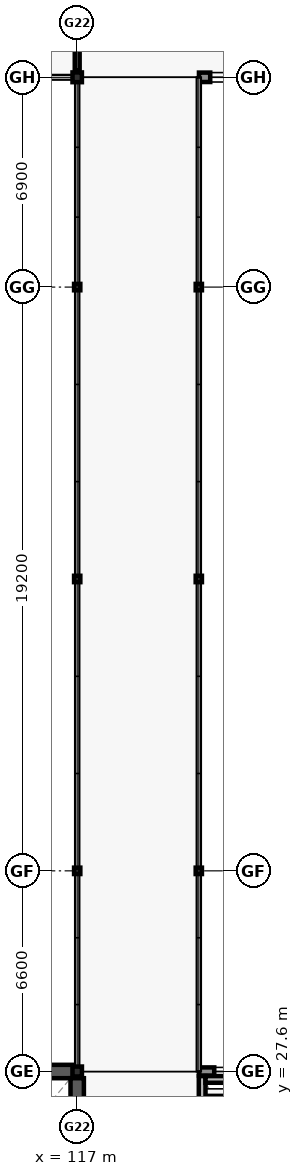
"""IFC4 building model, lengths in metres.
Left out: names, types, materials, properties, quantities, classifications, styles, units other than length and angle.
Written with IfcOpenShell. Run it as: python <this file> out.ifc"""

import sys

from ifc_helpers import new_model, si_unit, direction, frame, frame_2d, origin, origin_2d, place, context, subcontext, project, spatial, rectangle, i_section, extrude, element, fill, save


model = new_model("IFC4")
c1 = context("Model", 3, precision=1e-05, world=origin(), true_north=direction((0.0, 1.0)))
c2 = subcontext(c1, "Body", "Model", "MODEL_VIEW")
j1 = project(units=[si_unit("LENGTHUNIT", "METRE"), si_unit("PLANEANGLEUNIT", "RADIAN")], contexts=[c1])
p1 = place(None, origin())
s1 = spatial("IfcSite", under=j1, at=p1, CompositionType="ELEMENT")
p2 = place(p1, origin())
s2 = spatial("IfcBuilding", under=s1, at=p2, CompositionType="ELEMENT")
p3 = place(p2, frame((0.0, 0.0, 5.4)))
s3 = spatial("IfcBuildingStorey", under=s2, at=p3, CompositionType="ELEMENT", Elevation=5.4)
p4 = place(p3, frame((117.0, 27.6, 0.0), z_axis=(0.0, 0.0, 1.0), x_axis=(1.0, 0.0, 0.0)))
e1 = element("IfcColumn", 1, at=p4, inside=s3, PredefinedType="COLUMN", context=c2, shape_type="SweptSolid", body=[
    extrude(i_section(OverallWidth=0.311, OverallDepth=0.327, WebThickness=0.016, FlangeThickness=0.025, FilletRadius=0.017, at=origin_2d()), origin(), (0.0, 0.0, 1.0), 4.2),
])
for number, where, z_axis, x_axis in (
    (2, (117.0, 34.2, 0.0), (0.0, 0.0, 1.0), (1.0, 0.0, 0.0)),
    (3, (117.0, 43.8, 0.0), (0.0, 0.0, 1.0), (1.0, 0.0, 0.0)),
    (4, (117.0, 53.4, 0.0), (0.0, 0.0, 1.0), (1.0, 0.0, 0.0)),
):
    element("IfcColumn", number, at=place(p3, frame(where, z_axis=z_axis, x_axis=x_axis)), inside=s3, PredefinedType="COLUMN", context=c2, shape_type="SweptSolid", body=[
        extrude(i_section(OverallWidth=0.205, OverallDepth=0.21, WebThickness=0.009, FlangeThickness=0.014, FilletRadius=0.011, at=origin_2d()), origin(), (0.0, 0.0, 1.0), 4.2),
    ])
p5 = place(p3, frame((117.0, 60.3, 0.0), z_axis=(0.0, 0.0, 1.0), x_axis=(1.0, 0.0, 0.0)))
e5 = element("IfcColumn", 5, at=p5, inside=s3, PredefinedType="COLUMN", context=c2, shape_type="SweptSolid", body=[
    extrude(i_section(OverallWidth=0.309, OverallDepth=0.321, WebThickness=0.014, FlangeThickness=0.022, FilletRadius=0.017, at=origin_2d()), origin(), (0.0, 0.0, 1.0), 4.2),
])
for number, where, z_axis, x_axis in (
    (6, (121.0, 34.2, 0.0), (0.0, 0.0, 1.0), (1.0, 0.0, 0.0)),
    (7, (121.0, 43.8, 0.0), (0.0, 0.0, 1.0), (1.0, 0.0, 0.0)),
    (8, (121.0, 53.4, 0.0), (0.0, 0.0, 1.0), (1.0, 0.0, 0.0)),
):
    element("IfcColumn", number, at=place(p3, frame(where, z_axis=z_axis, x_axis=x_axis)), inside=s3, PredefinedType="COLUMN", context=c2, shape_type="SweptSolid", body=[
        extrude(i_section(OverallWidth=0.205, OverallDepth=0.21, WebThickness=0.009, FlangeThickness=0.014, FilletRadius=0.011, at=origin_2d()), origin(), (0.0, 0.0, 1.0), 4.2),
    ])
p6 = place(p3, frame((110.5, 27.6, 0.0), z_axis=(0.0, 0.0, 1.0), x_axis=(1.0, 0.0, 0.0)))
e9 = element("IfcWall", 9, at=p6, inside=s3, PredefinedType="SHEAR", context=c2, shape_type="SweptSolid", body=[
    extrude(rectangle(XDim=6.5, YDim=0.44, at=frame_2d((3.25, 0.0))), origin(), (0.0, 0.0, 1.0), 3.96),
])
p7 = place(p3, frame((117.0, 21.0, 0.0), z_axis=(0.0, 0.0, 1.0), x_axis=(0.0, 1.0, 0.0)))
e10 = element("IfcWall", 10, at=p7, inside=s3, PredefinedType="SHEAR", context=c2, shape_type="SweptSolid", body=[
    extrude(rectangle(XDim=6.38, YDim=0.44, at=frame_2d((3.19, 0.0))), origin(), (0.0, 0.0, 1.0), 3.96),
])
p8 = place(p3, frame((121.005, 27.6, 0.0), z_axis=(0.0, 0.0, 1.0), x_axis=(1.0, 0.0, 0.0)))
e11 = element("IfcWall", 11, at=p8, inside=s3, PredefinedType="SOLIDWALL", context=c2, shape_type="SweptSolid", body=[
    extrude(rectangle(XDim=2.49, YDim=0.27, at=frame_2d((1.245, 0.0))), origin(), (0.0, 0.0, 1.0), 3.32),
])
p9 = place(p8, frame((0.502, 0.0, 0.8)))
e12 = element("IfcOpeningElement", 12, at=p9, cuts=e11, PredefinedType="OPENING", context=c2, shape_type="SweptSolid", body=[
    extrude(rectangle(XDim=1.15, YDim=1.8, at=frame_2d((0.575, 0.9))), frame((0.0, 0.145, 0.0), z_axis=(0.0, -1.0, 0.0), x_axis=(1.0, 0.0, 0.0)), (0.0, 0.0, 1.0), 0.29),
])
p10 = place(p3, frame((123.495, 60.3, 0.0), z_axis=(0.0, 0.0, 1.0), x_axis=(-1.0, 0.0, 0.0)))
e13 = element("IfcWall", 13, at=p10, inside=s3, PredefinedType="SOLIDWALL", context=c2, shape_type="SweptSolid", body=[
    extrude(rectangle(XDim=2.49, YDim=0.31, at=frame_2d((1.245, 0.0))), origin(), (0.0, 0.0, 1.0), 3.32),
])
p11 = place(p10, frame((0.37, 0.0, 0.8)))
e14 = element("IfcOpeningElement", 14, at=p11, cuts=e13, PredefinedType="OPENING", context=c2, shape_type="SweptSolid", body=[
    extrude(rectangle(XDim=1.75, YDim=1.8, at=frame_2d((0.875, 0.9))), frame((0.0, 0.165, 0.0), z_axis=(0.0, -1.0, 0.0), x_axis=(1.0, 0.0, 0.0)), (0.0, 0.0, 1.0), 0.33),
])
p12 = place(p3, frame((121.11, 24.09, 0.0), z_axis=(0.0, 0.0, 1.0), x_axis=(0.0, 1.0, 0.0)))
e15 = element("IfcWall", 15, at=p12, inside=s3, PredefinedType="SOLIDWALL", context=c2, shape_type="SweptSolid", body=[
    extrude(rectangle(XDim=3.36, YDim=0.22, at=frame_2d((1.68, 0.0))), origin(), (0.0, 0.0, 1.0), 3.96),
])
p13 = place(p3, frame((121.22, 27.34, 0.0), z_axis=(0.0, 0.0, 1.0), x_axis=(1.0, 0.0, 0.0)))
e16 = element("IfcWall", 16, at=p13, inside=s3, PredefinedType="SOLIDWALL", context=c2, shape_type="SweptSolid", body=[
    extrude(rectangle(XDim=1.8, YDim=0.22, at=frame_2d((0.9, 0.0))), origin(), (0.0, 0.0, 1.0), 3.96),
])
p14 = place(p3, frame((117.0, 60.52, 0.0), z_axis=(0.0, 0.0, 1.0), x_axis=(0.0, 1.0, 0.0)))
e17 = element("IfcWall", 17, at=p14, inside=s3, PredefinedType="PARTITIONING", context=c2, shape_type="SweptSolid", body=[
    extrude(rectangle(XDim=10.76, YDim=0.16, at=frame_2d((5.38, 0.0))), origin(), (0.0, 0.0, 1.0), 3.3),
])
p15 = place(p14, frame((4.64, 0.0, 0.0)))
e18 = element("IfcOpeningElement", 18, at=p15, cuts=e17, PredefinedType="OPENING", context=c2, shape_type="SweptSolid", body=[
    extrude(rectangle(XDim=1.48, YDim=2.18, at=frame_2d((0.74, 1.09))), frame((0.0, 0.09, 0.0), z_axis=(0.0, -1.0, 0.0), x_axis=(1.0, 0.0, 0.0)), (0.0, 0.0, 1.0), 0.18),
])
p16 = place(p9, origin())
e19 = element("IfcWindow", 19, at=p16, inside=s3, PartitioningType="SINGLE_PANEL", PredefinedType="WINDOW", context=c2, shape_type="SweptSolid", body=[
    extrude(rectangle(XDim=1.15, YDim=1.8, at=frame_2d((0.575, 0.9))), frame((0.0, 0.03, 0.0), z_axis=(0.0, -1.0, 0.0), x_axis=(1.0, 0.0, 0.0)), (0.0, 0.0, 1.0), 0.06),
])
fill(e12, e19)
p17 = place(p11, origin())
e20 = element("IfcWindow", 20, at=p17, inside=s3, PartitioningType="DOUBLE_PANEL_VERTICAL", PredefinedType="WINDOW", context=c2, shape_type="SweptSolid", body=[
    extrude(rectangle(XDim=1.75, YDim=1.8, at=frame_2d((0.875, 0.9))), frame((0.0, 0.03, 0.0), z_axis=(0.0, -1.0, 0.0), x_axis=(1.0, 0.0, 0.0)), (0.0, 0.0, 1.0), 0.06),
])
fill(e14, e20)
save(model, sys.argv[1])
